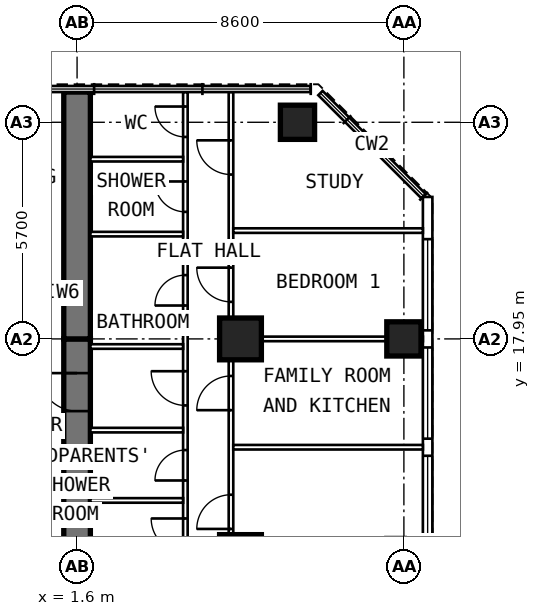
"""IFC4 building model, lengths in metres.
Left out: names, types, materials, properties, quantities, classifications, styles, units other than length and angle.
Written with IfcOpenShell. Run it as: python <this file> out.ifc"""

import sys

from ifc_helpers import new_model, si_unit, direction, frame, frame_2d, origin, origin_2d, place, context, subcontext, project, spatial, rectangle, extrude, element, fill, save


model = new_model("IFC4")
c1 = context("Model", 3, precision=1e-05, world=origin(), true_north=direction((0.0, 1.0)))
c2 = subcontext(c1, "Body", "Model", "MODEL_VIEW")
j1 = project(units=[si_unit("LENGTHUNIT", "METRE"), si_unit("PLANEANGLEUNIT", "RADIAN")], contexts=[c1])
p1 = place(None, origin())
s1 = spatial("IfcSite", under=j1, at=p1, CompositionType="ELEMENT")
p2 = place(p1, origin())
s2 = spatial("IfcBuilding", under=s1, at=p2, CompositionType="ELEMENT")
p3 = place(p2, frame((0.0, 0.0, 201.0)))
s3 = spatial("IfcBuildingStorey", under=s2, at=p3, CompositionType="ELEMENT", Elevation=201.0)
for number, where, z_axis, x_axis in (
    (1, (10.2, 17.95, 0.0), (0.0, 0.0, 1.0), (0.0, 1.0, 0.0)),
    (2, (7.4, 23.65, 0.0), (0.0, 0.0, 1.0), (0.0, 1.0, 0.0)),
):
    element("IfcColumn", number, at=place(p3, frame(where, z_axis=z_axis, x_axis=x_axis)), inside=s3, PredefinedType="COLUMN", context=c2, shape_type="SweptSolid", body=[
        extrude(rectangle(XDim=0.9, YDim=0.9, at=origin_2d()), origin(), (0.0, 0.0, 1.0), 3.6),
    ])
for number, where, z_axis, x_axis in (
    (3, (5.9, 12.25, 0.0), (0.0, 0.0, 1.0), (0.0, 1.0, 0.0)),
    (4, (5.9, 17.95, 0.0), (0.0, 0.0, 1.0), (0.0, 1.0, 0.0)),
):
    element("IfcColumn", number, at=place(p3, frame(where, z_axis=z_axis, x_axis=x_axis)), inside=s3, PredefinedType="COLUMN", context=c2, shape_type="SweptSolid", body=[
        extrude(rectangle(XDim=1.1, YDim=1.1, at=origin_2d()), origin(), (0.0, 0.0, 1.0), 3.6),
    ])
p4 = place(p3, frame((1.6, 9.6, 0.0), z_axis=(0.0, 0.0, 1.0), x_axis=(0.0, 1.0, 0.0)))
e5 = element("IfcWall", 5, at=p4, inside=s3, PredefinedType="SHEAR", context=c2, shape_type="SweptSolid", body=[
    extrude(rectangle(XDim=8.35, YDim=0.7, at=frame_2d((4.175, 0.0))), origin(), (0.0, 0.0, 1.0), 3.6),
])
p5 = place(p4, frame((6.45, 0.0, 0.0)))
e6 = element("IfcOpeningElement", 6, at=p5, cuts=e5, PredefinedType="OPENING", context=c2, shape_type="SweptSolid", body=[
    extrude(rectangle(XDim=1.0, YDim=2.1, at=frame_2d((0.5, 1.05))), frame((0.0, 0.362, 0.0), z_axis=(0.0, -1.0, 0.0), x_axis=(1.0, 0.0, 0.0)), (0.0, 0.0, 1.0), 0.724),
])
p6 = place(p3, frame((1.6, 17.95, 0.0), z_axis=(0.0, 0.0, 1.0), x_axis=(0.0, 1.0, 0.0)))
e7 = element("IfcWall", 7, at=p6, inside=s3, PredefinedType="SHEAR", context=c2, shape_type="SweptSolid", body=[
    extrude(rectangle(XDim=6.495, YDim=0.7, at=frame_2d((3.248, 0.0))), origin(), (0.0, 0.0, 1.0), 3.6),
])
p7 = place(p3, frame((10.825, 6.409, 0.0), z_axis=(0.0, 0.0, 1.0), x_axis=(0.0, 1.0, 0.0)))
e8 = element("IfcWall", 8, at=p7, inside=s3, PredefinedType="SOLIDWALL", context=c2, shape_type="SweptSolid", body=[
    extrude(rectangle(XDim=15.276, YDim=0.25, at=frame_2d((7.638, 0.0))), origin(), (0.0, 0.0, 1.0), 3.35),
])
p8 = place(p7, frame((0.366, 0.0, 0.8)))
e9 = element("IfcOpeningElement", 9, at=p8, cuts=e8, PredefinedType="OPENING", context=c2, shape_type="SweptSolid", body=[
    extrude(rectangle(XDim=2.4, YDim=1.8, at=frame_2d((1.2, 0.9))), frame((0.0, 0.137, 0.0), z_axis=(0.0, -1.0, 0.0), x_axis=(1.0, 0.0, 0.0)), (0.0, 0.0, 1.0), 0.274),
])
p9 = place(p7, frame((3.216, 0.0, 0.8)))
e10 = element("IfcOpeningElement", 10, at=p9, cuts=e8, PredefinedType="OPENING", context=c2, shape_type="SweptSolid", body=[
    extrude(rectangle(XDim=2.4, YDim=1.8, at=frame_2d((1.2, 0.9))), frame((0.0, 0.137, 0.0), z_axis=(0.0, -1.0, 0.0), x_axis=(1.0, 0.0, 0.0)), (0.0, 0.0, 1.0), 0.274),
])
p10 = place(p7, frame((6.066, 0.0, 0.8)))
e11 = element("IfcOpeningElement", 11, at=p10, cuts=e8, PredefinedType="OPENING", context=c2, shape_type="SweptSolid", body=[
    extrude(rectangle(XDim=2.4, YDim=1.8, at=frame_2d((1.2, 0.9))), frame((0.0, 0.137, 0.0), z_axis=(0.0, -1.0, 0.0), x_axis=(1.0, 0.0, 0.0)), (0.0, 0.0, 1.0), 0.274),
])
p11 = place(p7, frame((8.916, 0.0, 0.8)))
e12 = element("IfcOpeningElement", 12, at=p11, cuts=e8, PredefinedType="OPENING", context=c2, shape_type="SweptSolid", body=[
    extrude(rectangle(XDim=2.4, YDim=1.8, at=frame_2d((1.2, 0.9))), frame((0.0, 0.137, 0.0), z_axis=(0.0, -1.0, 0.0), x_axis=(1.0, 0.0, 0.0)), (0.0, 0.0, 1.0), 0.274),
])
p12 = place(p7, frame((11.766, 0.0, 0.8)))
e13 = element("IfcOpeningElement", 13, at=p12, cuts=e8, PredefinedType="OPENING", context=c2, shape_type="SweptSolid", body=[
    extrude(rectangle(XDim=2.4, YDim=1.8, at=frame_2d((1.2, 0.9))), frame((0.0, 0.137, 0.0), z_axis=(0.0, -1.0, 0.0), x_axis=(1.0, 0.0, 0.0)), (0.0, 0.0, 1.0), 0.274),
])
p13 = place(p3, frame((4.45, 9.925, 0.0), z_axis=(0.0, 0.0, 1.0), x_axis=(0.0, 1.0, 0.0)))
e14 = element("IfcWall", 14, at=p13, inside=s3, PredefinedType="PARTITIONING", context=c2, shape_type="SweptSolid", body=[
    extrude(rectangle(XDim=14.52, YDim=0.12, at=frame_2d((7.26, 0.0))), origin(), (0.0, 0.0, 1.0), 3.35),
])
p14 = place(p13, frame((0.6, 0.0, 0.0)))
e15 = element("IfcOpeningElement", 15, at=p14, cuts=e14, PredefinedType="OPENING", context=c2, shape_type="SweptSolid", body=[
    extrude(rectangle(XDim=0.8, YDim=2.1, at=frame_2d((0.4, 1.05))), frame((0.0, 0.072, 0.0), z_axis=(0.0, -1.0, 0.0), x_axis=(1.0, 0.0, 0.0)), (0.0, 0.0, 1.0), 0.144),
])
p15 = place(p13, frame((2.4, 0.0, 0.0)))
e16 = element("IfcOpeningElement", 16, at=p15, cuts=e14, PredefinedType="OPENING", context=c2, shape_type="SweptSolid", body=[
    extrude(rectangle(XDim=0.9, YDim=2.1, at=frame_2d((0.45, 1.05))), frame((0.0, 0.072, 0.0), z_axis=(0.0, -1.0, 0.0), x_axis=(1.0, 0.0, 0.0)), (0.0, 0.0, 1.0), 0.144),
])
p16 = place(p13, frame((4.3, 0.0, 0.0)))
e17 = element("IfcOpeningElement", 17, at=p16, cuts=e14, PredefinedType="OPENING", context=c2, shape_type="SweptSolid", body=[
    extrude(rectangle(XDim=0.8, YDim=2.1, at=frame_2d((0.4, 1.05))), frame((0.0, 0.072, 0.0), z_axis=(0.0, -1.0, 0.0), x_axis=(1.0, 0.0, 0.0)), (0.0, 0.0, 1.0), 0.144),
])
p17 = place(p13, frame((6.275, 0.0, 0.0)))
e18 = element("IfcOpeningElement", 18, at=p17, cuts=e14, PredefinedType="OPENING", context=c2, shape_type="SweptSolid", body=[
    extrude(rectangle(XDim=0.9, YDim=2.1, at=frame_2d((0.45, 1.05))), frame((0.0, 0.072, 0.0), z_axis=(0.0, -1.0, 0.0), x_axis=(1.0, 0.0, 0.0)), (0.0, 0.0, 1.0), 0.144),
])
p18 = place(p13, frame((8.904, 0.0, 0.0)))
e19 = element("IfcOpeningElement", 19, at=p18, cuts=e14, PredefinedType="OPENING", context=c2, shape_type="SweptSolid", body=[
    extrude(rectangle(XDim=0.8, YDim=2.1, at=frame_2d((0.4, 1.05))), frame((0.0, 0.072, 0.0), z_axis=(0.0, -1.0, 0.0), x_axis=(1.0, 0.0, 0.0)), (0.0, 0.0, 1.0), 0.144),
])
p19 = place(p13, frame((11.368, 0.0, 0.0)))
e20 = element("IfcOpeningElement", 20, at=p19, cuts=e14, PredefinedType="OPENING", context=c2, shape_type="SweptSolid", body=[
    extrude(rectangle(XDim=0.8, YDim=2.1, at=frame_2d((0.4, 1.05))), frame((0.0, 0.072, 0.0), z_axis=(0.0, -1.0, 0.0), x_axis=(1.0, 0.0, 0.0)), (0.0, 0.0, 1.0), 0.144),
])
p20 = place(p13, frame((13.339, 0.0, 0.0)))
e21 = element("IfcOpeningElement", 21, at=p20, cuts=e14, PredefinedType="OPENING", context=c2, shape_type="SweptSolid", body=[
    extrude(rectangle(XDim=0.8, YDim=2.1, at=frame_2d((0.4, 1.05))), frame((0.0, 0.072, 0.0), z_axis=(0.0, -1.0, 0.0), x_axis=(1.0, 0.0, 0.0)), (0.0, 0.0, 1.0), 0.144),
])
p21 = place(p3, frame((5.65, 9.6, 0.0), z_axis=(0.0, 0.0, 1.0), x_axis=(0.0, 1.0, 0.0)))
e22 = element("IfcWall", 22, at=p21, inside=s3, PredefinedType="PARTITIONING", context=c2, shape_type="SweptSolid", body=[
    extrude(rectangle(XDim=14.845, YDim=0.12, at=frame_2d((7.422, 0.0))), origin(), (0.0, 0.0, 1.0), 3.35),
])
p22 = place(p21, frame((3.35, 0.0, 0.0)))
e23 = element("IfcOpeningElement", 23, at=p22, cuts=e22, PredefinedType="OPENING", context=c2, shape_type="SweptSolid", body=[
    extrude(rectangle(XDim=0.9, YDim=2.1, at=frame_2d((0.45, 1.05))), frame((0.0, 0.072, 0.0), z_axis=(0.0, -1.0, 0.0), x_axis=(1.0, 0.0, 0.0)), (0.0, 0.0, 1.0), 0.144),
])
p23 = place(p21, frame((6.475, 0.0, 0.0)))
e24 = element("IfcOpeningElement", 24, at=p23, cuts=e22, PredefinedType="OPENING", context=c2, shape_type="SweptSolid", body=[
    extrude(rectangle(XDim=0.9, YDim=2.1, at=frame_2d((0.45, 1.05))), frame((0.0, 0.072, 0.0), z_axis=(0.0, -1.0, 0.0), x_axis=(1.0, 0.0, 0.0)), (0.0, 0.0, 1.0), 0.144),
])
p24 = place(p21, frame((9.325, 0.0, 0.0)))
e25 = element("IfcOpeningElement", 25, at=p24, cuts=e22, PredefinedType="OPENING", context=c2, shape_type="SweptSolid", body=[
    extrude(rectangle(XDim=0.9, YDim=2.1, at=frame_2d((0.45, 1.05))), frame((0.0, 0.072, 0.0), z_axis=(0.0, -1.0, 0.0), x_axis=(1.0, 0.0, 0.0)), (0.0, 0.0, 1.0), 0.144),
])
p25 = place(p21, frame((12.675, 0.0, 0.0)))
e26 = element("IfcOpeningElement", 26, at=p25, cuts=e22, PredefinedType="OPENING", context=c2, shape_type="SweptSolid", body=[
    extrude(rectangle(XDim=0.9, YDim=2.1, at=frame_2d((0.45, 1.05))), frame((0.0, 0.072, 0.0), z_axis=(0.0, -1.0, 0.0), x_axis=(1.0, 0.0, 0.0)), (0.0, 0.0, 1.0), 0.144),
])
p26 = place(p3, frame((5.71, 15.1, 0.0), z_axis=(0.0, 0.0, 1.0), x_axis=(1.0, 0.0, 0.0)))
e27 = element("IfcWall", 27, at=p26, inside=s3, PredefinedType="PARTITIONING", context=c2, shape_type="SweptSolid", body=[
    extrude(rectangle(XDim=4.99, YDim=0.12, at=frame_2d((2.495, 0.0))), origin(), (0.0, 0.0, 1.0), 3.35),
])
p27 = place(p3, frame((5.71, 17.95, 0.0), z_axis=(0.0, 0.0, 1.0), x_axis=(1.0, 0.0, 0.0)))
e28 = element("IfcWall", 28, at=p27, inside=s3, PredefinedType="PARTITIONING", context=c2, shape_type="SweptSolid", body=[
    extrude(rectangle(XDim=4.99, YDim=0.12, at=frame_2d((2.495, 0.0))), origin(), (0.0, 0.0, 1.0), 2.45),
])
p28 = place(p3, frame((5.71, 20.8, 0.0), z_axis=(0.0, 0.0, 1.0), x_axis=(1.0, 0.0, 0.0)))
e29 = element("IfcWall", 29, at=p28, inside=s3, PredefinedType="PARTITIONING", context=c2, shape_type="SweptSolid", body=[
    extrude(rectangle(XDim=4.99, YDim=0.12, at=frame_2d((2.495, 0.0))), origin(), (0.0, 0.0, 1.0), 3.35),
])
for number, where, z_axis, x_axis in (
    (30, (1.95, 13.7, 0.0), (0.0, 0.0, 1.0), (1.0, 0.0, 0.0)),
    (31, (1.95, 15.55, 0.0), (0.0, 0.0, 1.0), (1.0, 0.0, 0.0)),
):
    element("IfcWall", number, at=place(p3, frame(where, z_axis=z_axis, x_axis=x_axis)), inside=s3, PredefinedType="PARTITIONING", context=c2, shape_type="SweptSolid", body=[
        extrude(rectangle(XDim=2.44, YDim=0.12, at=frame_2d((1.22, 0.0))), origin(), (0.0, 0.0, 1.0), 3.35),
    ])
p29 = place(p3, frame((1.95, 17.75, 0.0), z_axis=(0.0, 0.0, 1.0), x_axis=(1.0, 0.0, 0.0)))
e32 = element("IfcWall", 32, at=p29, inside=s3, PredefinedType="PARTITIONING", context=c2, shape_type="SweptSolid", body=[
    extrude(rectangle(XDim=2.44, YDim=0.12, at=frame_2d((1.22, 0.0))), origin(), (0.0, 0.0, 1.0), 2.45),
])
for number, where, z_axis, x_axis in (
    (33, (1.95, 20.707, 0.0), (0.0, 0.0, 1.0), (1.0, 0.0, 0.0)),
    (34, (1.95, 22.678, 0.0), (0.0, 0.0, 1.0), (1.0, 0.0, 0.0)),
):
    element("IfcWall", number, at=place(p3, frame(where, z_axis=z_axis, x_axis=x_axis)), inside=s3, PredefinedType="PARTITIONING", context=c2, shape_type="SweptSolid", body=[
        extrude(rectangle(XDim=2.44, YDim=0.12, at=frame_2d((1.22, 0.0))), origin(), (0.0, 0.0, 1.0), 3.35),
    ])
p30 = place(p3, frame((1.25, 19.15, 0.0), z_axis=(0.0, 0.0, 1.0), x_axis=(-1.0, 0.0, 0.0)))
e35 = element("IfcWall", 35, at=p30, inside=s3, PredefinedType="PARTITIONING", context=c2, shape_type="SweptSolid", body=[
    extrude(rectangle(XDim=2.5, YDim=0.15, at=frame_2d((1.25, 0.0))), origin(), (0.0, 0.0, 1.0), 3.35),
])
p31 = place(p30, frame((0.75, 0.0, 0.0)))
e36 = element("IfcOpeningElement", 36, at=p31, cuts=e35, PredefinedType="OPENING", context=c2, shape_type="SweptSolid", body=[
    extrude(rectangle(XDim=1.0, YDim=2.1, at=frame_2d((0.5, 1.05))), frame((0.0, 0.087, 0.0), z_axis=(0.0, -1.0, 0.0), x_axis=(1.0, 0.0, 0.0)), (0.0, 0.0, 1.0), 0.174),
])
p32 = place(p10, origin())
e37 = element("IfcWindow", 37, at=p32, inside=s3, PartitioningType="SINGLE_PANEL", PredefinedType="WINDOW", context=c2, shape_type="SweptSolid", body=[
    extrude(rectangle(XDim=2.4, YDim=1.8, at=frame_2d((1.2, 0.9))), frame((0.0, 0.03, 0.0), z_axis=(0.0, -1.0, 0.0), x_axis=(1.0, 0.0, 0.0)), (0.0, 0.0, 1.0), 0.06),
])
fill(e11, e37)
p33 = place(p11, origin())
e38 = element("IfcWindow", 38, at=p33, inside=s3, PartitioningType="SINGLE_PANEL", PredefinedType="WINDOW", context=c2, shape_type="SweptSolid", body=[
    extrude(rectangle(XDim=2.4, YDim=1.8, at=frame_2d((1.2, 0.9))), frame((0.0, 0.03, 0.0), z_axis=(0.0, -1.0, 0.0), x_axis=(1.0, 0.0, 0.0)), (0.0, 0.0, 1.0), 0.06),
])
fill(e12, e38)
p34 = place(p12, origin())
e39 = element("IfcWindow", 39, at=p34, inside=s3, PartitioningType="SINGLE_PANEL", PredefinedType="WINDOW", context=c2, shape_type="SweptSolid", body=[
    extrude(rectangle(XDim=2.4, YDim=1.8, at=frame_2d((1.2, 0.9))), frame((0.0, 0.03, 0.0), z_axis=(0.0, -1.0, 0.0), x_axis=(1.0, 0.0, 0.0)), (0.0, 0.0, 1.0), 0.06),
])
fill(e13, e39)
p35 = place(p5, origin())
e40 = element("IfcDoor", 40, at=p35, inside=s3, OperationType="SINGLE_SWING_RIGHT", PredefinedType="DOOR", context=c2, shape_type="SweptSolid", body=[
    extrude(rectangle(XDim=1.0, YDim=2.1, at=frame_2d((0.5, 1.05))), frame((0.0, 0.1, 0.0), z_axis=(0.0, -1.0, 0.0), x_axis=(1.0, 0.0, 0.0)), (0.0, 0.0, 1.0), 0.2),
])
fill(e6, e40)
p36 = place(p22, origin())
e41 = element("IfcDoor", 41, at=p36, inside=s3, OperationType="SINGLE_SWING_LEFT", PredefinedType="DOOR", context=c2, shape_type="SweptSolid", body=[
    extrude(rectangle(XDim=0.9, YDim=2.1, at=frame_2d((0.45, 1.05))), frame((0.0, 0.025, 0.0), z_axis=(0.0, -1.0, 0.0), x_axis=(1.0, 0.0, 0.0)), (0.0, 0.0, 1.0), 0.05),
])
fill(e23, e41)
p37 = place(p23, origin())
e42 = element("IfcDoor", 42, at=p37, inside=s3, OperationType="SINGLE_SWING_LEFT", PredefinedType="DOOR", context=c2, shape_type="SweptSolid", body=[
    extrude(rectangle(XDim=0.9, YDim=2.1, at=frame_2d((0.45, 1.05))), frame((0.0, 0.025, 0.0), z_axis=(0.0, -1.0, 0.0), x_axis=(1.0, 0.0, 0.0)), (0.0, 0.0, 1.0), 0.05),
])
fill(e24, e42)
p38 = place(p24, origin())
e43 = element("IfcDoor", 43, at=p38, inside=s3, OperationType="SINGLE_SWING_RIGHT", PredefinedType="DOOR", context=c2, shape_type="SweptSolid", body=[
    extrude(rectangle(XDim=0.9, YDim=2.1, at=frame_2d((0.45, 1.05))), frame((0.0, 0.025, 0.0), z_axis=(0.0, -1.0, 0.0), x_axis=(1.0, 0.0, 0.0)), (0.0, 0.0, 1.0), 0.05),
])
fill(e25, e43)
p39 = place(p25, origin())
e44 = element("IfcDoor", 44, at=p39, inside=s3, OperationType="SINGLE_SWING_RIGHT", PredefinedType="DOOR", context=c2, shape_type="SweptSolid", body=[
    extrude(rectangle(XDim=0.9, YDim=2.1, at=frame_2d((0.45, 1.05))), frame((0.0, 0.025, 0.0), z_axis=(0.0, -1.0, 0.0), x_axis=(1.0, 0.0, 0.0)), (0.0, 0.0, 1.0), 0.05),
])
fill(e26, e44)
p40 = place(p15, origin())
e45 = element("IfcDoor", 45, at=p40, inside=s3, OperationType="SINGLE_SWING_RIGHT", PredefinedType="DOOR", context=c2, shape_type="SweptSolid", body=[
    extrude(rectangle(XDim=0.9, YDim=2.1, at=frame_2d((0.45, 1.05))), frame((0.0, 0.025, 0.0), z_axis=(0.0, -1.0, 0.0), x_axis=(1.0, 0.0, 0.0)), (0.0, 0.0, 1.0), 0.05),
])
fill(e16, e45)
p41 = place(p16, origin())
e46 = element("IfcDoor", 46, at=p41, inside=s3, OperationType="SINGLE_SWING_LEFT", PredefinedType="DOOR", context=c2, shape_type="SweptSolid", body=[
    extrude(rectangle(XDim=0.8, YDim=2.1, at=frame_2d((0.4, 1.05))), frame((0.0, 0.025, 0.0), z_axis=(0.0, -1.0, 0.0), x_axis=(1.0, 0.0, 0.0)), (0.0, 0.0, 1.0), 0.05),
])
fill(e17, e46)
p42 = place(p17, origin())
e47 = element("IfcDoor", 47, at=p42, inside=s3, OperationType="SINGLE_SWING_RIGHT", PredefinedType="DOOR", context=c2, shape_type="SweptSolid", body=[
    extrude(rectangle(XDim=0.9, YDim=2.1, at=frame_2d((0.45, 1.05))), frame((0.0, 0.025, 0.0), z_axis=(0.0, -1.0, 0.0), x_axis=(1.0, 0.0, 0.0)), (0.0, 0.0, 1.0), 0.05),
])
fill(e18, e47)
p43 = place(p18, origin())
e48 = element("IfcDoor", 48, at=p43, inside=s3, OperationType="SINGLE_SWING_LEFT", PredefinedType="DOOR", context=c2, shape_type="SweptSolid", body=[
    extrude(rectangle(XDim=0.8, YDim=2.1, at=frame_2d((0.4, 1.05))), frame((0.0, 0.025, 0.0), z_axis=(0.0, -1.0, 0.0), x_axis=(1.0, 0.0, 0.0)), (0.0, 0.0, 1.0), 0.05),
])
fill(e19, e48)
p44 = place(p19, origin())
e49 = element("IfcDoor", 49, at=p44, inside=s3, OperationType="SINGLE_SWING_RIGHT", PredefinedType="DOOR", context=c2, shape_type="SweptSolid", body=[
    extrude(rectangle(XDim=0.8, YDim=2.1, at=frame_2d((0.4, 1.05))), frame((0.0, 0.025, 0.0), z_axis=(0.0, -1.0, 0.0), x_axis=(1.0, 0.0, 0.0)), (0.0, 0.0, 1.0), 0.05),
])
fill(e20, e49)
p45 = place(p20, origin())
e50 = element("IfcDoor", 50, at=p45, inside=s3, OperationType="SINGLE_SWING_RIGHT", PredefinedType="DOOR", context=c2, shape_type="SweptSolid", body=[
    extrude(rectangle(XDim=0.8, YDim=2.1, at=frame_2d((0.4, 1.05))), frame((0.0, 0.025, 0.0), z_axis=(0.0, -1.0, 0.0), x_axis=(1.0, 0.0, 0.0)), (0.0, 0.0, 1.0), 0.05),
])
fill(e21, e50)
save(model, sys.argv[1])
